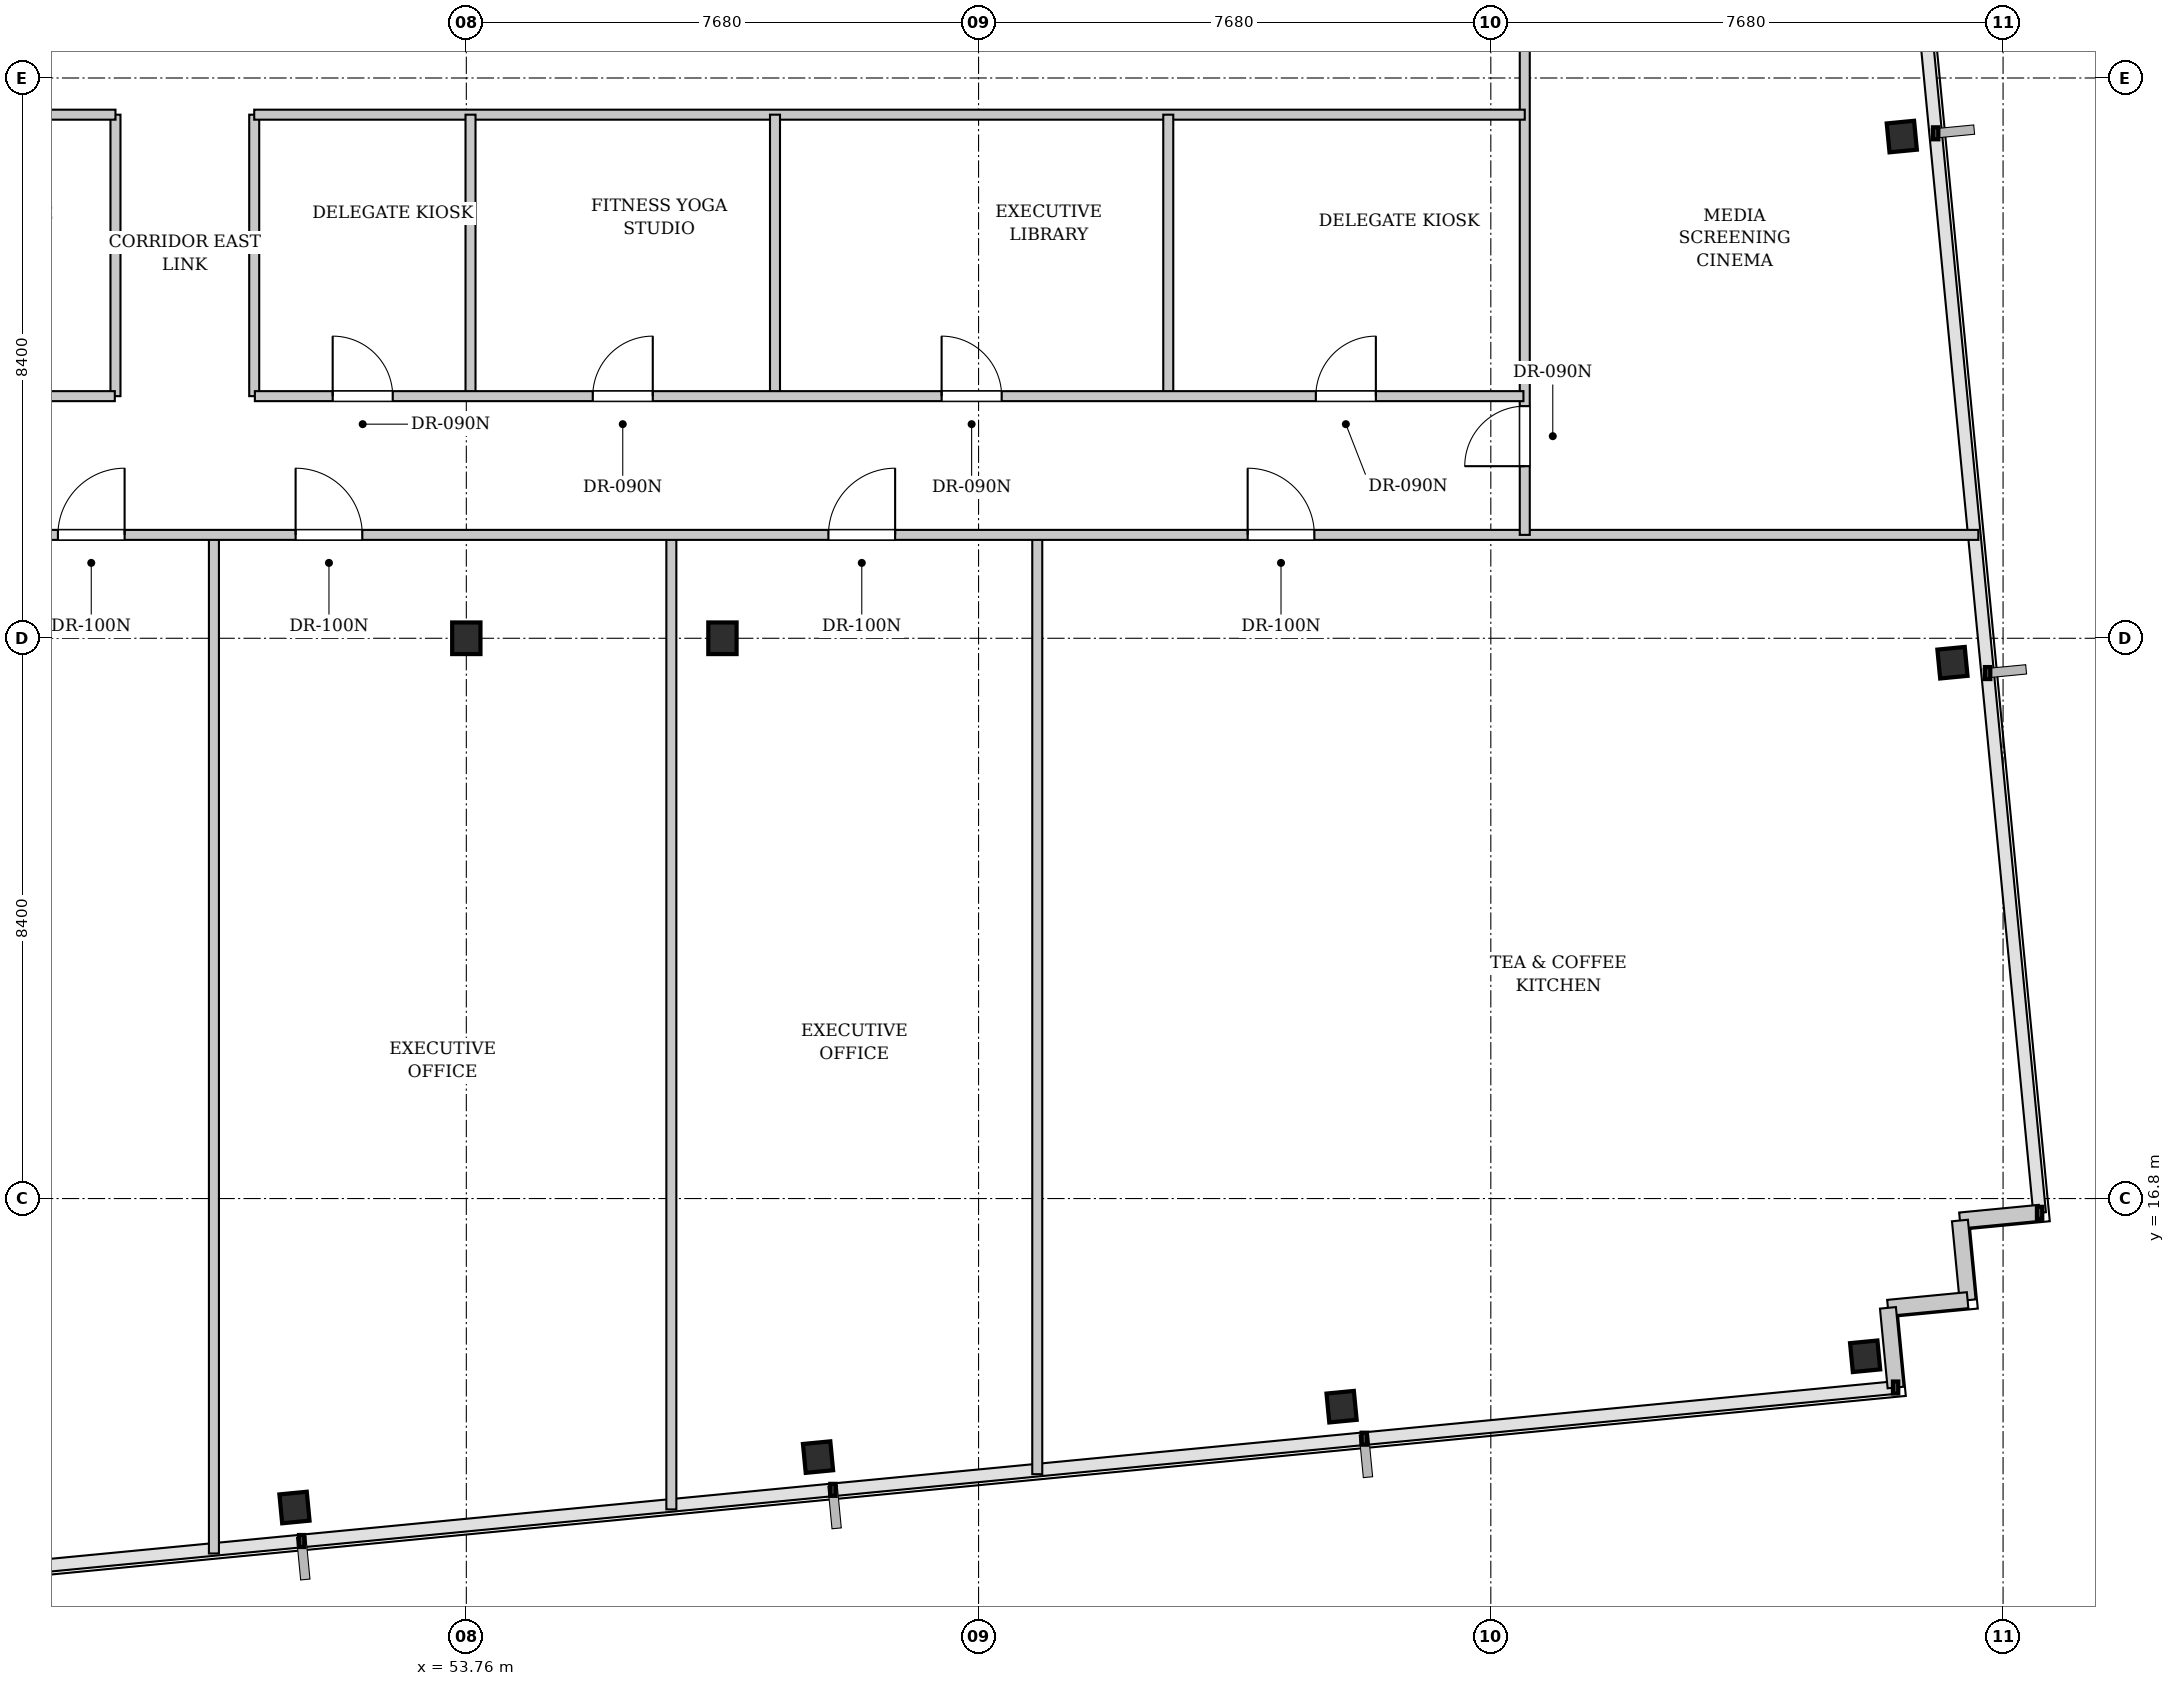
"""IFC4 building model, lengths in metres.
Left out: names, types, materials, properties, quantities, classifications, styles, units other than length and angle.
Written with IfcOpenShell. Run it as: python <this file> out.ifc"""

import sys

from ifc_helpers import new_model, si_unit, direction, frame, frame_2d, origin, origin_2d, place, context, subcontext, project, spatial, rectangle, i_section, extrude, element, fill, save


model = new_model("IFC4")
c1 = context("Model", 3, precision=1e-05, world=origin(), true_north=direction((0.0, 1.0)))
c2 = subcontext(c1, "Body", "Model", "MODEL_VIEW")
j1 = project(units=[si_unit("LENGTHUNIT", "METRE"), si_unit("PLANEANGLEUNIT", "RADIAN")], contexts=[c1])
p1 = place(None, origin())
s1 = spatial("IfcSite", under=j1, at=p1, CompositionType="ELEMENT")
p2 = place(p1, origin())
s2 = spatial("IfcBuilding", under=s1, at=p2, CompositionType="ELEMENT")
p3 = place(p2, frame((0.0, 0.0, 106.7)))
s3 = spatial("IfcBuildingStorey", under=s2, at=p3, CompositionType="ELEMENT", Elevation=106.7)
for number, where, z_axis, x_axis in (
    (1, (53.76, 25.2, 0.0), (0.0, 0.0, 1.0), (1.0, 0.0, 0.0)),
    (2, (57.6, 25.2, 0.0), (0.0, 0.0, 1.0), (1.0, 0.0, 0.0)),
):
    element("IfcColumn", number, at=place(p3, frame(where, z_axis=z_axis, x_axis=x_axis)), inside=s3, PredefinedType="COLUMN", context=c2, shape_type="SweptSolid", body=[
        extrude(i_section(OverallWidth=0.424, OverallDepth=0.474, WebThickness=0.047, FlangeThickness=0.077, FilletRadius=0.015, at=origin_2d()), origin(), (0.0, 0.0, 1.0), 3.4),
    ])
for number, where, z_axis, x_axis in (
    (3, (51.184, 12.167, 0.0), (0.0, 0.0, 1.0), (0.995, 0.096, 0.0)),
    (4, (59.033, 12.923, 0.0), (0.0, 0.0, 1.0), (0.995, 0.096, 0.0)),
    (5, (66.883, 13.679, 0.0), (0.0, 0.0, 1.0), (0.995, 0.096, 0.0)),
    (6, (74.732, 14.435, 0.0), (0.0, 0.0, 1.0), (0.995, 0.096, 0.0)),
    (7, (76.041, 24.833, 0.0), (0.0, 0.0, 1.0), (0.995, 0.096, 0.0)),
    (8, (75.282, 32.722, 0.0), (0.0, 0.0, 1.0), (0.995, 0.096, 0.0)),
):
    element("IfcColumn", number, at=place(p3, frame(where, z_axis=z_axis, x_axis=x_axis)), inside=s3, PredefinedType="COLUMN", context=c2, shape_type="SweptSolid", body=[
        extrude(i_section(OverallWidth=0.412, OverallDepth=0.435, WebThickness=0.036, FlangeThickness=0.058, FilletRadius=0.015, at=origin_2d()), origin(), (0.0, 0.0, 1.0), 3.4),
    ])
p4 = place(p3, frame((77.348, 16.586, 0.0), z_axis=(0.0, 0.0, 1.0), x_axis=(-0.995397091755, -0.095836473879, 0.0)))
e9 = element("IfcWall", 9, at=p4, inside=s3, PredefinedType="SOLIDWALL", context=c2, shape_type="SweptSolid", body=[
    extrude(rectangle(XDim=1.2, YDim=0.24, at=frame_2d((0.6, 0.0))), origin(), (0.0, 0.0, 1.0), 3.18),
])
for number, where, z_axis, x_axis in (
    (10, (76.153, 16.471, 0.0), (0.0, 0.0, 1.0), (0.096, -0.995, 0.0)),
    (11, (76.268, 15.276, 0.0), (0.0, 0.0, 1.0), (-0.995, -0.096, 0.0)),
):
    element("IfcWall", number, at=place(p3, frame(where, z_axis=z_axis, x_axis=x_axis)), inside=s3, PredefinedType="SOLIDWALL", context=c2, shape_type="SweptSolid", body=[
        extrude(rectangle(XDim=1.2, YDim=0.24, at=frame_2d((0.6, 0.0))), origin(), (0.0, 0.0, 1.0), 3.18),
    ])
p5 = place(p3, frame((75.074, 15.161, 0.0), z_axis=(0.0, 0.0, 1.0), x_axis=(0.095836473879, -0.995397091755, 0.0)))
e12 = element("IfcWall", 12, at=p5, inside=s3, PredefinedType="SOLIDWALL", context=c2, shape_type="SweptSolid", body=[
    extrude(rectangle(XDim=1.2, YDim=0.24, at=frame_2d((0.6, 0.0))), origin(), (0.0, 0.0, 1.0), 3.18),
])
p6 = place(p3, frame((49.976, 11.479, 0.0), z_axis=(0.0, 0.0, 1.0), x_axis=(0.0, 1.0, 0.0)))
e13 = element("IfcWall", 13, at=p6, inside=s3, PredefinedType="PARTITIONING", context=c2, shape_type="SweptSolid", body=[
    extrude(rectangle(XDim=15.291, YDim=0.15, at=frame_2d((7.646, 0.0))), origin(), (0.0, 0.0, 1.0), 3.18),
])
p7 = place(p3, frame((56.834, 12.139, 0.0), z_axis=(0.0, 0.0, 1.0), x_axis=(0.0, 1.0, 0.0)))
e14 = element("IfcWall", 14, at=p7, inside=s3, PredefinedType="PARTITIONING", context=c2, shape_type="SweptSolid", body=[
    extrude(rectangle(XDim=14.631, YDim=0.15, at=frame_2d((7.315, 0.0))), origin(), (0.0, 0.0, 1.0), 3.18),
])
p8 = place(p3, frame((62.32, 12.667, 0.0), z_axis=(0.0, 0.0, 1.0), x_axis=(0.0, 1.0, 0.0)))
e15 = element("IfcWall", 15, at=p8, inside=s3, PredefinedType="PARTITIONING", context=c2, shape_type="SweptSolid", body=[
    extrude(rectangle(XDim=14.103, YDim=0.15, at=frame_2d((7.051, 0.0))), origin(), (0.0, 0.0, 1.0), 3.18),
])
p9 = place(p3, frame((15.208, 26.75, 0.0), z_axis=(0.0, 0.0, 1.0), x_axis=(1.0, 0.0, 0.0)))
e16 = element("IfcWall", 16, at=p9, inside=s3, PredefinedType="PARTITIONING", context=c2, shape_type="SweptSolid", body=[
    extrude(rectangle(XDim=61.222, YDim=0.15, at=frame_2d((30.611, 0.0))), origin(), (0.0, 0.0, 1.0), 2.525),
])
p10 = place(p9, frame((9.474, 0.0, 0.0)))
e17 = element("IfcOpeningElement", 17, at=p10, cuts=e16, PredefinedType="OPENING", context=c2, shape_type="SweptSolid", body=[
    extrude(rectangle(XDim=1.0, YDim=2.15, at=frame_2d((0.5, 1.075))), frame((0.0, 0.085, 0.0), z_axis=(0.0, -1.0, 0.0), x_axis=(1.0, 0.0, 0.0)), (0.0, 0.0, 1.0), 0.17),
])
p11 = place(p9, frame((17.351, 0.0, 0.0)))
e18 = element("IfcOpeningElement", 18, at=p11, cuts=e16, PredefinedType="OPENING", context=c2, shape_type="SweptSolid", body=[
    extrude(rectangle(XDim=1.0, YDim=2.15, at=frame_2d((0.5, 1.075))), frame((0.0, 0.085, 0.0), z_axis=(0.0, -1.0, 0.0), x_axis=(1.0, 0.0, 0.0)), (0.0, 0.0, 1.0), 0.17),
])
p12 = place(p9, frame((24.736, 0.0, 0.0)))
e19 = element("IfcOpeningElement", 19, at=p12, cuts=e16, PredefinedType="OPENING", context=c2, shape_type="SweptSolid", body=[
    extrude(rectangle(XDim=1.0, YDim=2.15, at=frame_2d((0.5, 1.075))), frame((0.0, 0.085, 0.0), z_axis=(0.0, -1.0, 0.0), x_axis=(1.0, 0.0, 0.0)), (0.0, 0.0, 1.0), 0.17),
])
p13 = place(p9, frame((32.429, 0.0, 0.0)))
e20 = element("IfcOpeningElement", 20, at=p13, cuts=e16, PredefinedType="OPENING", context=c2, shape_type="SweptSolid", body=[
    extrude(rectangle(XDim=1.0, YDim=2.15, at=frame_2d((0.5, 1.075))), frame((0.0, 0.085, 0.0), z_axis=(0.0, -1.0, 0.0), x_axis=(1.0, 0.0, 0.0)), (0.0, 0.0, 1.0), 0.17),
])
p14 = place(p9, frame((35.993, 0.0, 0.0)))
e21 = element("IfcOpeningElement", 21, at=p14, cuts=e16, PredefinedType="OPENING", context=c2, shape_type="SweptSolid", body=[
    extrude(rectangle(XDim=1.0, YDim=2.15, at=frame_2d((0.5, 1.075))), frame((0.0, 0.085, 0.0), z_axis=(0.0, -1.0, 0.0), x_axis=(1.0, 0.0, 0.0)), (0.0, 0.0, 1.0), 0.17),
])
p15 = place(p9, frame((43.982, 0.0, 0.0)))
e22 = element("IfcOpeningElement", 22, at=p15, cuts=e16, PredefinedType="OPENING", context=c2, shape_type="SweptSolid", body=[
    extrude(rectangle(XDim=1.0, YDim=2.15, at=frame_2d((0.5, 1.075))), frame((0.0, 0.085, 0.0), z_axis=(0.0, -1.0, 0.0), x_axis=(1.0, 0.0, 0.0)), (0.0, 0.0, 1.0), 0.17),
])
p16 = place(p9, frame((50.267, 0.0, 0.0)))
e23 = element("IfcOpeningElement", 23, at=p16, cuts=e16, PredefinedType="OPENING", context=c2, shape_type="SweptSolid", body=[
    extrude(rectangle(XDim=1.0, YDim=2.15, at=frame_2d((0.5, 1.075))), frame((0.0, 0.085, 0.0), z_axis=(0.0, -1.0, 0.0), x_axis=(1.0, 0.0, 0.0)), (0.0, 0.0, 1.0), 0.17),
])
p17 = place(p3, frame((69.629, 26.75, 0.0), z_axis=(0.0, 0.0, 1.0), x_axis=(0.0, 1.0, 0.0)))
e24 = element("IfcWall", 24, at=p17, inside=s3, PredefinedType="PARTITIONING", context=c2, shape_type="SweptSolid", body=[
    extrude(rectangle(XDim=24.234, YDim=0.15, at=frame_2d((12.117, 0.0))), origin(), (0.0, 0.0, 1.0), 3.18),
])
p18 = place(p17, frame((1.03, 0.0, 0.0)))
e25 = element("IfcOpeningElement", 25, at=p18, cuts=e24, PredefinedType="OPENING", context=c2, shape_type="SweptSolid", body=[
    extrude(rectangle(XDim=0.9, YDim=2.15, at=frame_2d((0.45, 1.075))), frame((0.0, 0.085, 0.0), z_axis=(0.0, -1.0, 0.0), x_axis=(1.0, 0.0, 0.0)), (0.0, 0.0, 1.0), 0.17),
])
for number, where, z_axis, x_axis in (
    (26, (48.5, 28.83, 0.0), (0.0, 0.0, 1.0), (0.0, 1.0, 0.0)),
    (27, (50.58, 28.83, 0.0), (0.0, 0.0, 1.0), (0.0, 1.0, 0.0)),
):
    element("IfcWall", number, at=place(p3, frame(where, z_axis=z_axis, x_axis=x_axis)), inside=s3, PredefinedType="PARTITIONING", context=c2, shape_type="SweptSolid", body=[
        extrude(rectangle(XDim=4.22, YDim=0.15, at=frame_2d((2.11, 0.0))), origin(), (0.0, 0.0, 1.0), 3.18),
    ])
p19 = place(p3, frame((28.38, 33.05, 0.0), z_axis=(0.0, 0.0, 1.0), x_axis=(1.0, 0.0, 0.0)))
e28 = element("IfcWall", 28, at=p19, inside=s3, PredefinedType="PARTITIONING", context=c2, shape_type="SweptSolid", body=[
    extrude(rectangle(XDim=20.12, YDim=0.15, at=frame_2d((10.06, 0.0))), origin(), (0.0, 0.0, 1.0), 3.18),
])
p20 = place(p3, frame((50.58, 33.05, 0.0), z_axis=(0.0, 0.0, 1.0), x_axis=(1.0, 0.0, 0.0)))
e29 = element("IfcWall", 29, at=p20, inside=s3, PredefinedType="PARTITIONING", context=c2, shape_type="SweptSolid", body=[
    extrude(rectangle(XDim=19.049, YDim=0.15, at=frame_2d((9.524, 0.0))), origin(), (0.0, 0.0, 1.0), 2.525),
])
p21 = place(p3, frame((28.39, 28.83, 0.0), z_axis=(0.0, 0.0, 1.0), x_axis=(1.0, 0.0, 0.0)))
e30 = element("IfcWall", 30, at=p21, inside=s3, PredefinedType="PARTITIONING", context=c2, shape_type="SweptSolid", body=[
    extrude(rectangle(XDim=20.1, YDim=0.15, at=frame_2d((10.05, 0.0))), origin(), (0.0, 0.0, 1.0), 3.18),
])
p22 = place(p21, frame((1.259, 0.0, 0.0)))
e31 = element("IfcOpeningElement", 31, at=p22, cuts=e30, PredefinedType="OPENING", context=c2, shape_type="SweptSolid", body=[
    extrude(rectangle(XDim=0.9, YDim=2.15, at=frame_2d((0.45, 1.075))), frame((0.0, 0.085, 0.0), z_axis=(0.0, -1.0, 0.0), x_axis=(1.0, 0.0, 0.0)), (0.0, 0.0, 1.0), 0.17),
])
p23 = place(p21, frame((5.379, 0.0, 0.0)))
e32 = element("IfcOpeningElement", 32, at=p23, cuts=e30, PredefinedType="OPENING", context=c2, shape_type="SweptSolid", body=[
    extrude(rectangle(XDim=0.9, YDim=2.15, at=frame_2d((0.45, 1.075))), frame((0.0, 0.085, 0.0), z_axis=(0.0, -1.0, 0.0), x_axis=(1.0, 0.0, 0.0)), (0.0, 0.0, 1.0), 0.17),
])
p24 = place(p21, frame((10.906, 0.0, 0.0)))
e33 = element("IfcOpeningElement", 33, at=p24, cuts=e30, PredefinedType="OPENING", context=c2, shape_type="SweptSolid", body=[
    extrude(rectangle(XDim=0.9, YDim=2.15, at=frame_2d((0.45, 1.075))), frame((0.0, 0.085, 0.0), z_axis=(0.0, -1.0, 0.0), x_axis=(1.0, 0.0, 0.0)), (0.0, 0.0, 1.0), 0.17),
])
p25 = place(p21, frame((16.836, 0.0, 0.0)))
e34 = element("IfcOpeningElement", 34, at=p25, cuts=e30, PredefinedType="OPENING", context=c2, shape_type="SweptSolid", body=[
    extrude(rectangle(XDim=0.9, YDim=2.15, at=frame_2d((0.45, 1.075))), frame((0.0, 0.085, 0.0), z_axis=(0.0, -1.0, 0.0), x_axis=(1.0, 0.0, 0.0)), (0.0, 0.0, 1.0), 0.17),
])
p26 = place(p3, frame((53.823, 28.83, 0.0), z_axis=(0.0, 0.0, 1.0), x_axis=(0.0, 1.0, 0.0)))
e35 = element("IfcWall", 35, at=p26, inside=s3, PredefinedType="PARTITIONING", context=c2, shape_type="SweptSolid", body=[
    extrude(rectangle(XDim=4.22, YDim=0.15, at=frame_2d((2.11, 0.0))), origin(), (0.0, 0.0, 1.0), 2.525),
])
for number, where, z_axis, x_axis in (
    (36, (58.388, 28.83, 0.0), (0.0, 0.0, 1.0), (0.0, 1.0, 0.0)),
    (37, (64.284, 28.83, 0.0), (0.0, 0.0, 1.0), (0.0, 1.0, 0.0)),
):
    element("IfcWall", number, at=place(p3, frame(where, z_axis=z_axis, x_axis=x_axis)), inside=s3, PredefinedType="PARTITIONING", context=c2, shape_type="SweptSolid", body=[
        extrude(rectangle(XDim=4.22, YDim=0.15, at=frame_2d((2.11, 0.0))), origin(), (0.0, 0.0, 1.0), 3.18),
    ])
p27 = place(p3, frame((50.59, 28.83, 0.0), z_axis=(0.0, 0.0, 1.0), x_axis=(1.0, 0.0, 0.0)))
e38 = element("IfcWall", 38, at=p27, inside=s3, PredefinedType="PARTITIONING", context=c2, shape_type="SweptSolid", body=[
    extrude(rectangle(XDim=19.019, YDim=0.15, at=frame_2d((9.509, 0.0))), origin(), (0.0, 0.0, 1.0), 2.525),
])
p28 = place(p27, frame((1.167, 0.0, 0.0)))
e39 = element("IfcOpeningElement", 39, at=p28, cuts=e38, PredefinedType="OPENING", context=c2, shape_type="SweptSolid", body=[
    extrude(rectangle(XDim=0.9, YDim=2.15, at=frame_2d((0.45, 1.075))), frame((0.0, 0.085, 0.0), z_axis=(0.0, -1.0, 0.0), x_axis=(1.0, 0.0, 0.0)), (0.0, 0.0, 1.0), 0.17),
])
p29 = place(p27, frame((5.065, 0.0, 0.0)))
e40 = element("IfcOpeningElement", 40, at=p29, cuts=e38, PredefinedType="OPENING", context=c2, shape_type="SweptSolid", body=[
    extrude(rectangle(XDim=0.9, YDim=2.15, at=frame_2d((0.45, 1.075))), frame((0.0, 0.085, 0.0), z_axis=(0.0, -1.0, 0.0), x_axis=(1.0, 0.0, 0.0)), (0.0, 0.0, 1.0), 0.17),
])
p30 = place(p27, frame((10.296, 0.0, 0.0)))
e41 = element("IfcOpeningElement", 41, at=p30, cuts=e38, PredefinedType="OPENING", context=c2, shape_type="SweptSolid", body=[
    extrude(rectangle(XDim=0.9, YDim=2.15, at=frame_2d((0.45, 1.075))), frame((0.0, 0.085, 0.0), z_axis=(0.0, -1.0, 0.0), x_axis=(1.0, 0.0, 0.0)), (0.0, 0.0, 1.0), 0.17),
])
p31 = place(p27, frame((15.906, 0.0, 0.0)))
e42 = element("IfcOpeningElement", 42, at=p31, cuts=e38, PredefinedType="OPENING", context=c2, shape_type="SweptSolid", body=[
    extrude(rectangle(XDim=0.9, YDim=2.15, at=frame_2d((0.45, 1.075))), frame((0.0, 0.085, 0.0), z_axis=(0.0, -1.0, 0.0), x_axis=(1.0, 0.0, 0.0)), (0.0, 0.0, 1.0), 0.17),
])
p32 = place(p13, origin())
e43 = element("IfcDoor", 43, at=p32, inside=s3, OperationType="SINGLE_SWING_RIGHT", PredefinedType="DOOR", context=c2, shape_type="SweptSolid", body=[
    extrude(rectangle(XDim=1.0, YDim=2.15, at=frame_2d((0.5, 1.075))), frame((0.0, 0.025, 0.0), z_axis=(0.0, -1.0, 0.0), x_axis=(1.0, 0.0, 0.0)), (0.0, 0.0, 1.0), 0.05),
])
fill(e20, e43)
p33 = place(p14, origin())
e44 = element("IfcDoor", 44, at=p33, inside=s3, OperationType="SINGLE_SWING_LEFT", PredefinedType="DOOR", context=c2, shape_type="SweptSolid", body=[
    extrude(rectangle(XDim=1.0, YDim=2.15, at=frame_2d((0.5, 1.075))), frame((0.0, 0.025, 0.0), z_axis=(0.0, -1.0, 0.0), x_axis=(1.0, 0.0, 0.0)), (0.0, 0.0, 1.0), 0.05),
])
fill(e21, e44)
p34 = place(p15, origin())
e45 = element("IfcDoor", 45, at=p34, inside=s3, OperationType="SINGLE_SWING_RIGHT", PredefinedType="DOOR", context=c2, shape_type="SweptSolid", body=[
    extrude(rectangle(XDim=1.0, YDim=2.15, at=frame_2d((0.5, 1.075))), frame((0.0, 0.025, 0.0), z_axis=(0.0, -1.0, 0.0), x_axis=(1.0, 0.0, 0.0)), (0.0, 0.0, 1.0), 0.05),
])
fill(e22, e45)
p35 = place(p16, origin())
e46 = element("IfcDoor", 46, at=p35, inside=s3, OperationType="SINGLE_SWING_LEFT", PredefinedType="DOOR", context=c2, shape_type="SweptSolid", body=[
    extrude(rectangle(XDim=1.0, YDim=2.15, at=frame_2d((0.5, 1.075))), frame((0.0, 0.025, 0.0), z_axis=(0.0, -1.0, 0.0), x_axis=(1.0, 0.0, 0.0)), (0.0, 0.0, 1.0), 0.05),
])
fill(e23, e46)
p36 = place(p18, origin())
e47 = element("IfcDoor", 47, at=p36, inside=s3, OperationType="SINGLE_SWING_LEFT", PredefinedType="DOOR", context=c2, shape_type="SweptSolid", body=[
    extrude(rectangle(XDim=0.9, YDim=2.15, at=frame_2d((0.45, 1.075))), frame((0.0, 0.025, 0.0), z_axis=(0.0, -1.0, 0.0), x_axis=(1.0, 0.0, 0.0)), (0.0, 0.0, 1.0), 0.05),
])
fill(e25, e47)
p37 = place(p28, origin())
e48 = element("IfcDoor", 48, at=p37, inside=s3, OperationType="SINGLE_SWING_LEFT", PredefinedType="DOOR", context=c2, shape_type="SweptSolid", body=[
    extrude(rectangle(XDim=0.9, YDim=2.15, at=frame_2d((0.45, 1.075))), frame((0.0, 0.025, 0.0), z_axis=(0.0, -1.0, 0.0), x_axis=(1.0, 0.0, 0.0)), (0.0, 0.0, 1.0), 0.05),
])
fill(e39, e48)
p38 = place(p29, origin())
e49 = element("IfcDoor", 49, at=p38, inside=s3, OperationType="SINGLE_SWING_RIGHT", PredefinedType="DOOR", context=c2, shape_type="SweptSolid", body=[
    extrude(rectangle(XDim=0.9, YDim=2.15, at=frame_2d((0.45, 1.075))), frame((0.0, 0.025, 0.0), z_axis=(0.0, -1.0, 0.0), x_axis=(1.0, 0.0, 0.0)), (0.0, 0.0, 1.0), 0.05),
])
fill(e40, e49)
p39 = place(p30, origin())
e50 = element("IfcDoor", 50, at=p39, inside=s3, OperationType="SINGLE_SWING_LEFT", PredefinedType="DOOR", context=c2, shape_type="SweptSolid", body=[
    extrude(rectangle(XDim=0.9, YDim=2.15, at=frame_2d((0.45, 1.075))), frame((0.0, 0.025, 0.0), z_axis=(0.0, -1.0, 0.0), x_axis=(1.0, 0.0, 0.0)), (0.0, 0.0, 1.0), 0.05),
])
fill(e41, e50)
p40 = place(p31, origin())
e51 = element("IfcDoor", 51, at=p40, inside=s3, OperationType="SINGLE_SWING_RIGHT", PredefinedType="DOOR", context=c2, shape_type="SweptSolid", body=[
    extrude(rectangle(XDim=0.9, YDim=2.15, at=frame_2d((0.45, 1.075))), frame((0.0, 0.025, 0.0), z_axis=(0.0, -1.0, 0.0), x_axis=(1.0, 0.0, 0.0)), (0.0, 0.0, 1.0), 0.05),
])
fill(e42, e51)
save(model, sys.argv[1])
